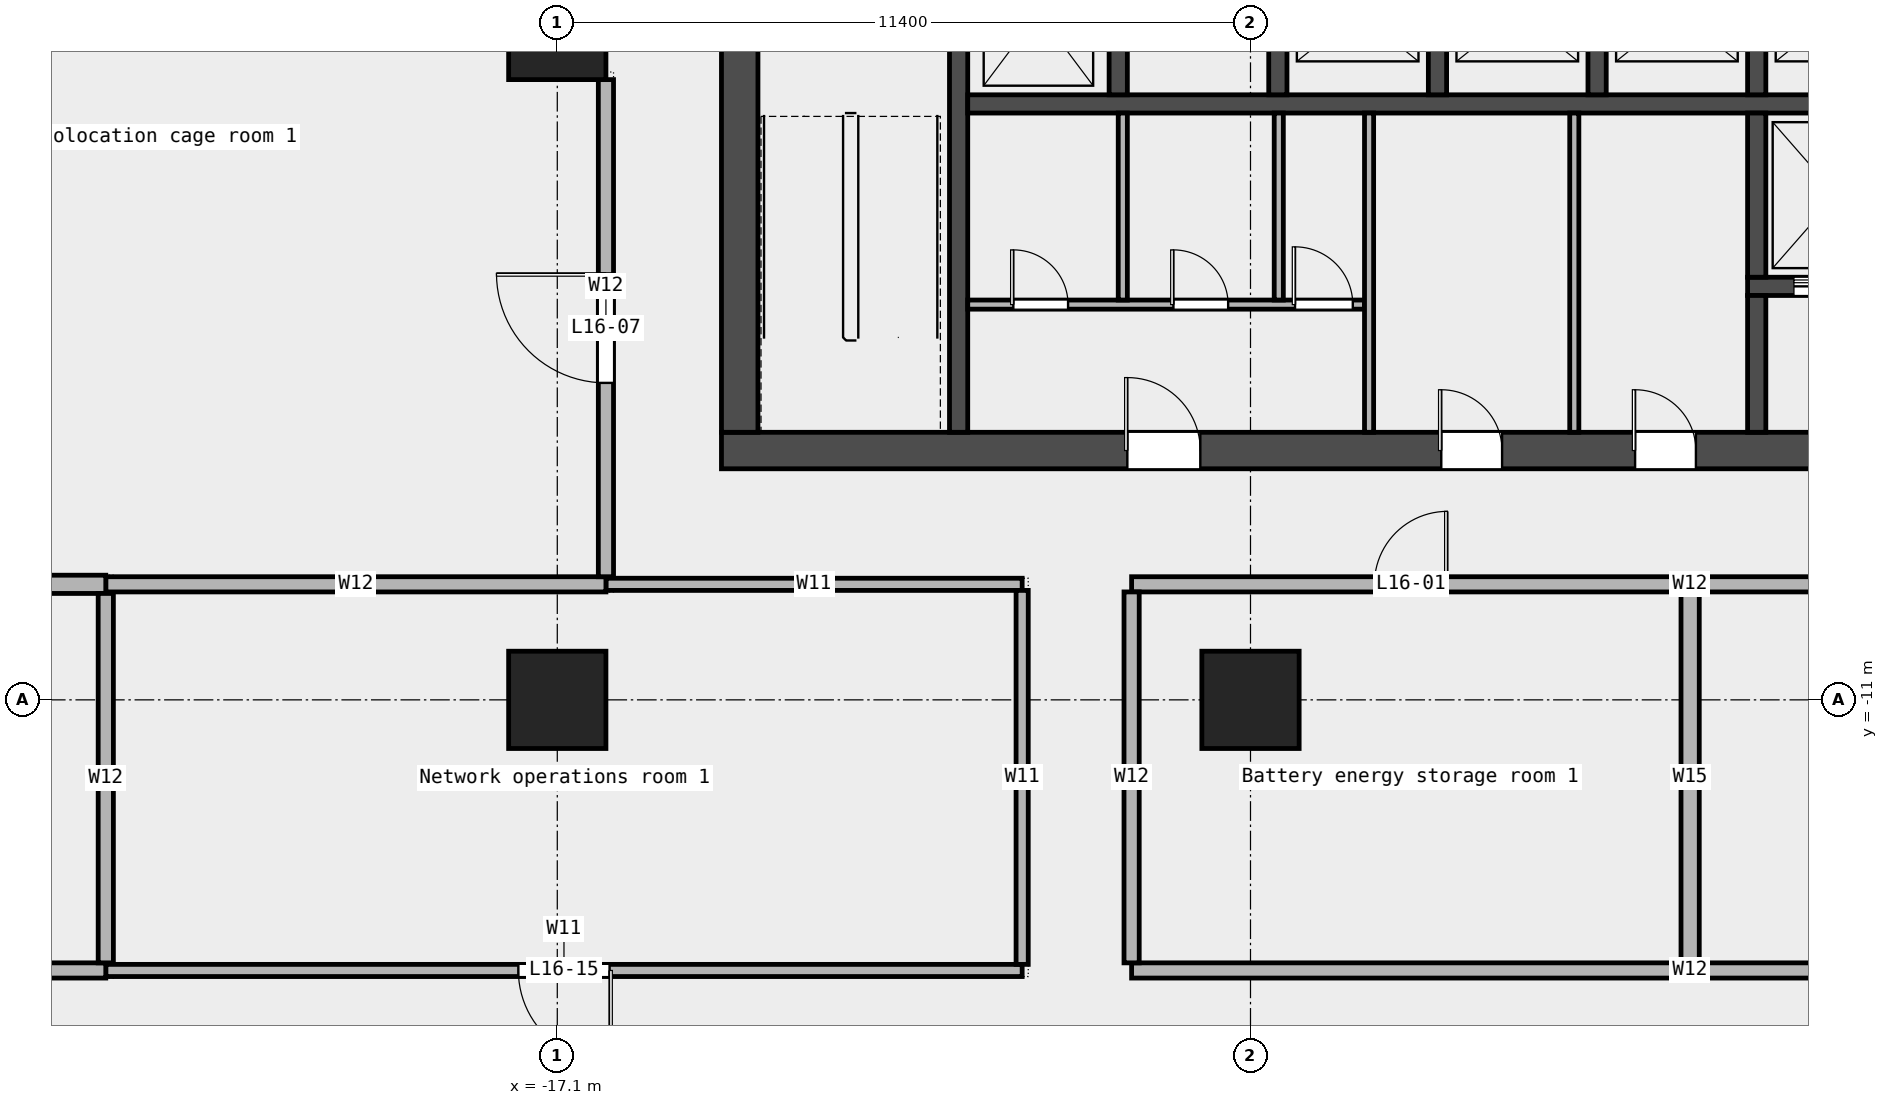
"""IFC4 building model, lengths in metres.
Left out: names, types, materials, properties, quantities, classifications, styles, units other than length and angle.
Written with IfcOpenShell. Run it as: python <this file> out.ifc"""

import sys

from ifc_helpers import new_model, si_unit, direction, frame, frame_2d, origin, origin_2d, place, context, subcontext, project, spatial, rectangle, extrude, element, fill, save


model = new_model("IFC4")
c1 = context("Model", 3, precision=1e-05, world=origin(), true_north=direction((0.0, 1.0)))
c2 = subcontext(c1, "Body", "Model", "MODEL_VIEW")
j1 = project(units=[si_unit("LENGTHUNIT", "METRE"), si_unit("PLANEANGLEUNIT", "RADIAN")], contexts=[c1])
p1 = place(None, origin())
s1 = spatial("IfcSite", under=j1, at=p1, CompositionType="ELEMENT")
p2 = place(p1, origin())
s2 = spatial("IfcBuilding", under=s1, at=p2, CompositionType="ELEMENT")
p3 = place(p2, frame((0.0, 0.0, 83.8)))
s3 = spatial("IfcBuildingStorey", under=s2, at=p3, CompositionType="ELEMENT", Elevation=83.8)
for number, where, z_axis, x_axis in (
    (1, (-17.1, -11.0, 0.0), (0.0, 0.0, 1.0), (1.0, 0.0, 0.0)),
    (2, (-17.1, 0.0, 0.0), (0.0, 0.0, 1.0), (1.0, 0.0, 0.0)),
    (3, (-5.7, -11.0, 0.0), (0.0, 0.0, 1.0), (1.0, 0.0, 0.0)),
):
    element("IfcColumn", number, at=place(p3, frame(where, z_axis=z_axis, x_axis=x_axis)), inside=s3, PredefinedType="COLUMN", context=c2, shape_type="SweptSolid", body=[
        extrude(rectangle(XDim=1.6, YDim=1.6, at=origin_2d()), origin(), (0.0, 0.0, 1.0), 4.2),
    ])
p4 = place(p3, frame((-24.525, -15.45, 0.0), z_axis=(0.0, 0.0, 1.0), x_axis=(1.0, 0.0, 0.0)))
e4 = element("IfcWall", 4, at=p4, inside=s3, PredefinedType="PARTITIONING", context=c2, shape_type="SweptSolid", body=[
    extrude(rectangle(XDim=15.07, YDim=0.2, at=frame_2d((7.535, 0.0))), origin(), (0.0, 0.0, 1.0), 4.2),
])
p5 = place(p4, frame((6.785, 0.0, 0.0)))
e5 = element("IfcOpeningElement", 5, at=p5, cuts=e4, PredefinedType="OPENING", context=c2, shape_type="SweptSolid", body=[
    extrude(rectangle(XDim=1.5, YDim=2.1, at=frame_2d((0.75, 1.05))), frame((0.0, 0.112, 0.0), z_axis=(0.0, -1.0, 0.0), x_axis=(1.0, 0.0, 0.0)), (0.0, 0.0, 1.0), 0.224),
])
p6 = place(p3, frame((-30.75, -15.45, 0.0), z_axis=(0.0, 0.0, 1.0), x_axis=(1.0, 0.0, 0.0)))
e6 = element("IfcWall", 6, at=p6, inside=s3, PredefinedType="PARTITIONING", context=c2, shape_type="SweptSolid", body=[
    extrude(rectangle(XDim=6.225, YDim=0.25, at=frame_2d((3.113, 0.0))), origin(), (0.0, 0.0, 1.0), 4.2),
])
p7 = place(p6, frame((2.762, 0.0, 0.0)))
e7 = element("IfcOpeningElement", 7, at=p7, cuts=e6, PredefinedType="OPENING", context=c2, shape_type="SweptSolid", body=[
    extrude(rectangle(XDim=0.9, YDim=2.1, at=frame_2d((0.45, 1.05))), frame((0.0, 0.137, 0.0), z_axis=(0.0, -1.0, 0.0), x_axis=(1.0, 0.0, 0.0)), (0.0, 0.0, 1.0), 0.274),
])
p8 = place(p3, frame((-7.655, -15.45, 0.0), z_axis=(0.0, 0.0, 1.0), x_axis=(1.0, 0.0, 0.0)))
e8 = element("IfcWall", 8, at=p8, inside=s3, PredefinedType="PARTITIONING", context=c2, shape_type="SweptSolid", body=[
    extrude(rectangle(XDim=18.365, YDim=0.25, at=frame_2d((9.183, 0.0))), origin(), (0.0, 0.0, 1.0), 4.2),
])
p9 = place(p3, frame((-16.3, -9.1, 0.0), z_axis=(0.0, 0.0, 1.0), x_axis=(1.0, 0.0, 0.0)))
e9 = element("IfcWall", 9, at=p9, inside=s3, PredefinedType="PARTITIONING", context=c2, shape_type="SweptSolid", body=[
    extrude(rectangle(XDim=6.845, YDim=0.2, at=frame_2d((3.422, 0.0))), origin(), (0.0, 0.0, 1.0), 4.2),
])
p10 = place(p3, frame((-24.525, -9.1, 0.0), z_axis=(0.0, 0.0, 1.0), x_axis=(1.0, 0.0, 0.0)))
e10 = element("IfcWall", 10, at=p10, inside=s3, PredefinedType="PARTITIONING", context=c2, shape_type="SweptSolid", body=[
    extrude(rectangle(XDim=8.225, YDim=0.25, at=frame_2d((4.112, 0.0))), origin(), (0.0, 0.0, 1.0), 4.2),
])
p11 = place(p3, frame((-7.655, -9.1, 0.0), z_axis=(0.0, 0.0, 1.0), x_axis=(1.0, 0.0, 0.0)))
e11 = element("IfcWall", 11, at=p11, inside=s3, PredefinedType="PARTITIONING", context=c2, shape_type="SweptSolid", body=[
    extrude(rectangle(XDim=18.365, YDim=0.25, at=frame_2d((9.183, 0.0))), origin(), (0.0, 0.0, 1.0), 4.2),
])
p12 = place(p11, frame((3.992, 0.0, 0.0)))
e12 = element("IfcOpeningElement", 12, at=p12, cuts=e11, PredefinedType="OPENING", context=c2, shape_type="SweptSolid", body=[
    extrude(rectangle(XDim=1.2, YDim=2.1, at=frame_2d((0.6, 1.05))), frame((0.0, 0.137, 0.0), z_axis=(0.0, -1.0, 0.0), x_axis=(1.0, 0.0, 0.0)), (0.0, 0.0, 1.0), 0.274),
])
p13 = place(p11, frame((14.375, 0.0, 0.0)))
e13 = element("IfcOpeningElement", 13, at=p13, cuts=e11, PredefinedType="OPENING", context=c2, shape_type="SweptSolid", body=[
    extrude(rectangle(XDim=1.2, YDim=2.1, at=frame_2d((0.6, 1.05))), frame((0.0, 0.137, 0.0), z_axis=(0.0, -1.0, 0.0), x_axis=(1.0, 0.0, 0.0)), (0.0, 0.0, 1.0), 0.274),
])
p14 = place(p3, frame((-30.75, -9.1, 0.0), z_axis=(0.0, 0.0, 1.0), x_axis=(1.0, 0.0, 0.0)))
e14 = element("IfcWall", 14, at=p14, inside=s3, PredefinedType="PARTITIONING", context=c2, shape_type="SweptSolid", body=[
    extrude(rectangle(XDim=6.225, YDim=0.3, at=frame_2d((3.113, 0.0))), origin(), (0.0, 0.0, 1.0), 4.2),
])
p15 = place(p3, frame((-24.525, -15.325, 0.0), z_axis=(0.0, 0.0, 1.0), x_axis=(0.0, 1.0, 0.0)))
e15 = element("IfcWall", 15, at=p15, inside=s3, PredefinedType="PARTITIONING", context=c2, shape_type="SweptSolid", body=[
    extrude(rectangle(XDim=6.075, YDim=0.25, at=frame_2d((3.038, 0.0))), origin(), (0.0, 0.0, 1.0), 4.2),
])
p16 = place(p3, frame((-16.3, -8.975, 0.0), z_axis=(0.0, 0.0, 1.0), x_axis=(0.0, 1.0, 0.0)))
e16 = element("IfcWall", 16, at=p16, inside=s3, PredefinedType="PARTITIONING", context=c2, shape_type="SweptSolid", body=[
    extrude(rectangle(XDim=8.175, YDim=0.25, at=frame_2d((4.087, 0.0))), origin(), (0.0, 0.0, 1.0), 4.2),
])
p17 = place(p16, frame((3.188, 0.0, 0.0)))
e17 = element("IfcOpeningElement", 17, at=p17, cuts=e16, PredefinedType="OPENING", context=c2, shape_type="SweptSolid", body=[
    extrude(rectangle(XDim=1.8, YDim=2.1, at=frame_2d((0.9, 1.05))), frame((0.0, 0.137, 0.0), z_axis=(0.0, -1.0, 0.0), x_axis=(1.0, 0.0, 0.0)), (0.0, 0.0, 1.0), 0.274),
])
p18 = place(p3, frame((-9.455, -15.35, 0.0), z_axis=(0.0, 0.0, 1.0), x_axis=(0.0, 1.0, 0.0)))
e18 = element("IfcWall", 18, at=p18, inside=s3, PredefinedType="PARTITIONING", context=c2, shape_type="SweptSolid", body=[
    extrude(rectangle(XDim=6.15, YDim=0.2, at=frame_2d((3.075, 0.0))), origin(), (0.0, 0.0, 1.0), 4.2),
])
p19 = place(p3, frame((-7.655, -15.325, 0.0), z_axis=(0.0, 0.0, 1.0), x_axis=(0.0, 1.0, 0.0)))
e19 = element("IfcWall", 19, at=p19, inside=s3, PredefinedType="PARTITIONING", context=c2, shape_type="SweptSolid", body=[
    extrude(rectangle(XDim=6.1, YDim=0.25, at=frame_2d((3.05, 0.0))), origin(), (0.0, 0.0, 1.0), 4.2),
])
p20 = place(p3, frame((1.53, -15.325, 0.0), z_axis=(0.0, 0.0, 1.0), x_axis=(0.0, 1.0, 0.0)))
e20 = element("IfcWall", 20, at=p20, inside=s3, PredefinedType="PARTITIONING", context=c2, shape_type="SweptSolid", body=[
    extrude(rectangle(XDim=6.1, YDim=0.3, at=frame_2d((3.05, 0.0))), origin(), (0.0, 0.0, 1.0), 4.2),
])
p21 = place(p3, frame((-14.4, -6.9, 0.0), z_axis=(0.0, 0.0, 1.0), x_axis=(1.0, 0.0, 0.0)))
e21 = element("IfcWall", 21, at=p21, inside=s3, PredefinedType="SHEAR", context=c2, shape_type="SweptSolid", body=[
    extrude(rectangle(XDim=28.8, YDim=0.6, at=frame_2d((14.4, 0.0))), origin(), (0.0, 0.0, 1.0), 4.5),
])
p22 = place(p21, frame((6.675, 0.0, 0.0)))
e22 = element("IfcOpeningElement", 22, at=p22, cuts=e21, PredefinedType="OPENING", context=c2, shape_type="SweptSolid", body=[
    extrude(rectangle(XDim=1.2, YDim=2.1, at=frame_2d((0.6, 1.05))), frame((0.0, 0.312, 0.0), z_axis=(0.0, -1.0, 0.0), x_axis=(1.0, 0.0, 0.0)), (0.0, 0.0, 1.0), 0.624),
])
p23 = place(p21, frame((11.837, 0.0, 0.0)))
e23 = element("IfcOpeningElement", 23, at=p23, cuts=e21, PredefinedType="OPENING", context=c2, shape_type="SweptSolid", body=[
    extrude(rectangle(XDim=1.0, YDim=2.1, at=frame_2d((0.5, 1.05))), frame((0.0, 0.312, 0.0), z_axis=(0.0, -1.0, 0.0), x_axis=(1.0, 0.0, 0.0)), (0.0, 0.0, 1.0), 0.624),
])
p24 = place(p21, frame((15.025, 0.0, 0.0)))
e24 = element("IfcOpeningElement", 24, at=p24, cuts=e21, PredefinedType="OPENING", context=c2, shape_type="SweptSolid", body=[
    extrude(rectangle(XDim=1.0, YDim=2.1, at=frame_2d((0.5, 1.05))), frame((0.0, 0.312, 0.0), z_axis=(0.0, -1.0, 0.0), x_axis=(1.0, 0.0, 0.0)), (0.0, 0.0, 1.0), 0.624),
])
p25 = place(p21, frame((18.75, 0.0, 0.0)))
e25 = element("IfcOpeningElement", 25, at=p25, cuts=e21, PredefinedType="OPENING", context=c2, shape_type="SweptSolid", body=[
    extrude(rectangle(XDim=1.8, YDim=2.1, at=frame_2d((0.9, 1.05))), frame((0.0, 0.312, 0.0), z_axis=(0.0, -1.0, 0.0), x_axis=(1.0, 0.0, 0.0)), (0.0, 0.0, 1.0), 0.624),
])
p26 = place(p21, frame((23.087, 0.0, 0.0)))
e26 = element("IfcOpeningElement", 26, at=p26, cuts=e21, PredefinedType="OPENING", context=c2, shape_type="SweptSolid", body=[
    extrude(rectangle(XDim=1.0, YDim=2.1, at=frame_2d((0.5, 1.05))), frame((0.0, 0.312, 0.0), z_axis=(0.0, -1.0, 0.0), x_axis=(1.0, 0.0, 0.0)), (0.0, 0.0, 1.0), 0.624),
])
p27 = place(p3, frame((-14.1, -6.6, 0.0), z_axis=(0.0, 0.0, 1.0), x_axis=(0.0, 1.0, 0.0)))
e27 = element("IfcWall", 27, at=p27, inside=s3, PredefinedType="SHEAR", context=c2, shape_type="SweptSolid", body=[
    extrude(rectangle(XDim=19.5, YDim=0.6, at=frame_2d((9.75, 0.0))), origin(), (0.0, 0.0, 1.0), 4.5),
])
p28 = place(p27, frame((9.3, 0.0, 0.0)))
e28 = element("IfcOpeningElement", 28, at=p28, cuts=e27, PredefinedType="OPENING", context=c2, shape_type="SweptSolid", body=[
    extrude(rectangle(XDim=1.8, YDim=2.1, at=frame_2d((0.9, 1.05))), frame((0.0, 0.312, 0.0), z_axis=(0.0, -1.0, 0.0), x_axis=(1.0, 0.0, 0.0)), (0.0, 0.0, 1.0), 0.624),
])
p29 = place(p3, frame((-10.5, -6.6, 0.0), z_axis=(0.0, 0.0, 1.0), x_axis=(0.0, 1.0, 0.0)))
e29 = element("IfcWall", 29, at=p29, inside=s3, PredefinedType="SHEAR", context=c2, shape_type="SweptSolid", body=[
    extrude(rectangle(XDim=8.55, YDim=0.3, at=frame_2d((4.275, 0.0))), origin(), (0.0, 0.0, 1.0), 4.5),
])
p30 = place(p3, frame((-10.35, -1.2, 0.0), z_axis=(0.0, 0.0, 1.0), x_axis=(1.0, 0.0, 0.0)))
e30 = element("IfcWall", 30, at=p30, inside=s3, PredefinedType="SOLIDWALL", context=c2, shape_type="SweptSolid", body=[
    extrude(rectangle(XDim=20.7, YDim=0.3, at=frame_2d((10.35, 0.0))), origin(), (0.0, 0.0, 1.0), 4.5),
])
for number, where, z_axis, x_axis in (
    (31, (-7.875, -1.05, 0.0), (0.0, 0.0, 1.0), (0.0, 1.0, 0.0)),
    (32, (-5.25, -1.05, 0.0), (0.0, 0.0, 1.0), (0.0, 1.0, 0.0)),
    (33, (-2.625, -1.05, 0.0), (0.0, 0.0, 1.0), (0.0, 1.0, 0.0)),
    (34, (0.0, -1.05, 0.0), (0.0, 0.0, 1.0), (0.0, 1.0, 0.0)),
    (35, (2.625, -1.05, 0.0), (0.0, 0.0, 1.0), (0.0, 1.0, 0.0)),
):
    element("IfcWall", number, at=place(p3, frame(where, z_axis=z_axis, x_axis=x_axis)), inside=s3, PredefinedType="SOLIDWALL", context=c2, shape_type="SweptSolid", body=[
        extrude(rectangle(XDim=2.7, YDim=0.3, at=frame_2d((1.35, 0.0))), origin(), (0.0, 0.0, 1.0), 4.5),
    ])
p31 = place(p3, frame((2.475, -4.2, 0.0), z_axis=(0.0, 0.0, 1.0), x_axis=(1.0, 0.0, 0.0)))
e36 = element("IfcWall", 36, at=p31, inside=s3, PredefinedType="SOLIDWALL", context=c2, shape_type="SweptSolid", body=[
    extrude(rectangle(XDim=5.55, YDim=0.3, at=frame_2d((2.775, 0.0))), origin(), (0.0, 0.0, 1.0), 4.5),
])
p32 = place(p31, frame((0.762, 0.0, 0.0)))
e37 = element("IfcOpeningElement", 37, at=p32, cuts=e36, PredefinedType="OPENING", context=c2, shape_type="SweptSolid", body=[
    extrude(rectangle(XDim=1.4, YDim=2.1, at=frame_2d((0.7, 1.05))), frame((0.0, 0.162, 0.0), z_axis=(0.0, -1.0, 0.0), x_axis=(1.0, 0.0, 0.0)), (0.0, 0.0, 1.0), 0.324),
])
p33 = place(p31, frame((3.387, 0.0, 0.0)))
e38 = element("IfcOpeningElement", 38, at=p33, cuts=e36, PredefinedType="OPENING", context=c2, shape_type="SweptSolid", body=[
    extrude(rectangle(XDim=1.4, YDim=2.1, at=frame_2d((0.7, 1.05))), frame((0.0, 0.162, 0.0), z_axis=(0.0, -1.0, 0.0), x_axis=(1.0, 0.0, 0.0)), (0.0, 0.0, 1.0), 0.324),
])
p34 = place(p3, frame((2.625, -4.05, 0.0), z_axis=(0.0, 0.0, 1.0), x_axis=(0.0, 1.0, 0.0)))
e39 = element("IfcWall", 39, at=p34, inside=s3, PredefinedType="SOLIDWALL", context=c2, shape_type="SweptSolid", body=[
    extrude(rectangle(XDim=2.7, YDim=0.3, at=frame_2d((1.35, 0.0))), origin(), (0.0, 0.0, 1.0), 4.5),
])
p35 = place(p3, frame((2.625, -6.6, 0.0), z_axis=(0.0, 0.0, 1.0), x_axis=(0.0, 1.0, 0.0)))
e40 = element("IfcWall", 40, at=p35, inside=s3, PredefinedType="SOLIDWALL", context=c2, shape_type="SweptSolid", body=[
    extrude(rectangle(XDim=2.25, YDim=0.3, at=frame_2d((1.125, 0.0))), origin(), (0.0, 0.0, 1.0), 4.5),
])
p36 = place(p3, frame((-10.35, -4.5, 0.0), z_axis=(0.0, 0.0, 1.0), x_axis=(1.0, 0.0, 0.0)))
e41 = element("IfcWall", 41, at=p36, inside=s3, PredefinedType="PARTITIONING", context=c2, shape_type="SweptSolid", body=[
    extrude(rectangle(XDim=6.525, YDim=0.15, at=frame_2d((3.263, 0.0))), origin(), (0.0, 0.0, 1.0), 4.5),
])
p37 = place(p36, frame((0.75, 0.0, 0.0)))
e42 = element("IfcOpeningElement", 42, at=p37, cuts=e41, PredefinedType="OPENING", context=c2, shape_type="SweptSolid", body=[
    extrude(rectangle(XDim=0.9, YDim=2.1, at=frame_2d((0.45, 1.05))), frame((0.0, 0.087, 0.0), z_axis=(0.0, -1.0, 0.0), x_axis=(1.0, 0.0, 0.0)), (0.0, 0.0, 1.0), 0.174),
])
p38 = place(p36, frame((3.383, 0.0, 0.0)))
e43 = element("IfcOpeningElement", 43, at=p38, cuts=e41, PredefinedType="OPENING", context=c2, shape_type="SweptSolid", body=[
    extrude(rectangle(XDim=0.9, YDim=2.1, at=frame_2d((0.45, 1.05))), frame((0.0, 0.087, 0.0), z_axis=(0.0, -1.0, 0.0), x_axis=(1.0, 0.0, 0.0)), (0.0, 0.0, 1.0), 0.174),
])
p39 = place(p36, frame((5.383, 0.0, 0.0)))
e44 = element("IfcOpeningElement", 44, at=p39, cuts=e41, PredefinedType="OPENING", context=c2, shape_type="SweptSolid", body=[
    extrude(rectangle(XDim=0.95, YDim=2.1, at=frame_2d((0.475, 1.05))), frame((0.0, 0.087, 0.0), z_axis=(0.0, -1.0, 0.0), x_axis=(1.0, 0.0, 0.0)), (0.0, 0.0, 1.0), 0.174),
])
for number, where, z_axis, x_axis in (
    (45, (-7.8, -4.425, 0.0), (0.0, 0.0, 1.0), (0.0, 1.0, 0.0)),
    (46, (-5.235, -4.425, 0.0), (0.0, 0.0, 1.0), (0.0, 1.0, 0.0)),
):
    element("IfcWall", number, at=place(p3, frame(where, z_axis=z_axis, x_axis=x_axis)), inside=s3, PredefinedType="PARTITIONING", context=c2, shape_type="SweptSolid", body=[
        extrude(rectangle(XDim=3.075, YDim=0.15, at=frame_2d((1.538, 0.0))), origin(), (0.0, 0.0, 1.0), 4.5),
    ])
for number, where, z_axis, x_axis in (
    (47, (-3.75, -6.6, 0.0), (0.0, 0.0, 1.0), (0.0, 1.0, 0.0)),
    (48, (-0.375, -6.6, 0.0), (0.0, 0.0, 1.0), (0.0, 1.0, 0.0)),
):
    element("IfcWall", number, at=place(p3, frame(where, z_axis=z_axis, x_axis=x_axis)), inside=s3, PredefinedType="PARTITIONING", context=c2, shape_type="SweptSolid", body=[
        extrude(rectangle(XDim=5.25, YDim=0.15, at=frame_2d((2.625, 0.0))), origin(), (0.0, 0.0, 1.0), 4.5),
    ])
p40 = place(p12, origin())
e49 = element("IfcDoor", 49, at=p40, inside=s3, OperationType="SINGLE_SWING_RIGHT", PredefinedType="DOOR", context=c2, shape_type="SweptSolid", body=[
    extrude(rectangle(XDim=1.2, YDim=2.1, at=frame_2d((0.6, 1.05))), frame((0.0, 0.025, 0.0), z_axis=(0.0, -1.0, 0.0), x_axis=(1.0, 0.0, 0.0)), (0.0, 0.0, 1.0), 0.05),
])
fill(e12, e49)
p41 = place(p17, origin())
e50 = element("IfcDoor", 50, at=p41, inside=s3, OperationType="DOUBLE_DOOR_SINGLE_SWING", PredefinedType="DOOR", context=c2, shape_type="SweptSolid", body=[
    extrude(rectangle(XDim=1.8, YDim=2.1, at=frame_2d((0.9, 1.05))), frame((0.0, 0.025, 0.0), z_axis=(0.0, -1.0, 0.0), x_axis=(1.0, 0.0, 0.0)), (0.0, 0.0, 1.0), 0.05),
])
fill(e17, e50)
p42 = place(p5, origin())
e51 = element("IfcDoor", 51, at=p42, inside=s3, OperationType="DOUBLE_DOOR_SINGLE_SWING", PredefinedType="DOOR", context=c2, shape_type="SweptSolid", body=[
    extrude(rectangle(XDim=1.5, YDim=2.1, at=frame_2d((0.75, 1.05))), frame((0.0, 0.025, 0.0), z_axis=(0.0, -1.0, 0.0), x_axis=(1.0, 0.0, 0.0)), (0.0, 0.0, 1.0), 0.05),
])
fill(e5, e51)
p43 = place(p32, origin())
e52 = element("IfcDoor", 52, at=p43, inside=s3, OperationType="DOUBLE_DOOR_SLIDING", PredefinedType="DOOR", context=c2, shape_type="SweptSolid", body=[
    extrude(rectangle(XDim=1.4, YDim=2.1, at=frame_2d((0.7, 1.05))), frame((0.0, 0.025, 0.0), z_axis=(0.0, -1.0, 0.0), x_axis=(1.0, 0.0, 0.0)), (0.0, 0.0, 1.0), 0.05),
])
fill(e37, e52)
p44 = place(p22, origin())
e53 = element("IfcDoor", 53, at=p44, inside=s3, OperationType="SINGLE_SWING_LEFT", PredefinedType="DOOR", context=c2, shape_type="SweptSolid", body=[
    extrude(rectangle(XDim=1.2, YDim=2.1, at=frame_2d((0.6, 1.05))), frame((0.0, 0.025, 0.0), z_axis=(0.0, -1.0, 0.0), x_axis=(1.0, 0.0, 0.0)), (0.0, 0.0, 1.0), 0.05),
])
fill(e22, e53)
p45 = place(p37, origin())
e54 = element("IfcDoor", 54, at=p45, inside=s3, OperationType="SINGLE_SWING_LEFT", PredefinedType="DOOR", context=c2, shape_type="SweptSolid", body=[
    extrude(rectangle(XDim=0.9, YDim=2.1, at=frame_2d((0.45, 1.05))), frame((0.0, 0.025, 0.0), z_axis=(0.0, -1.0, 0.0), x_axis=(1.0, 0.0, 0.0)), (0.0, 0.0, 1.0), 0.05),
])
fill(e42, e54)
p46 = place(p38, origin())
e55 = element("IfcDoor", 55, at=p46, inside=s3, OperationType="SINGLE_SWING_LEFT", PredefinedType="DOOR", context=c2, shape_type="SweptSolid", body=[
    extrude(rectangle(XDim=0.9, YDim=2.1, at=frame_2d((0.45, 1.05))), frame((0.0, 0.025, 0.0), z_axis=(0.0, -1.0, 0.0), x_axis=(1.0, 0.0, 0.0)), (0.0, 0.0, 1.0), 0.05),
])
fill(e43, e55)
p47 = place(p39, origin())
e56 = element("IfcDoor", 56, at=p47, inside=s3, OperationType="SINGLE_SWING_LEFT", PredefinedType="DOOR", context=c2, shape_type="SweptSolid", body=[
    extrude(rectangle(XDim=0.95, YDim=2.1, at=frame_2d((0.475, 1.05))), frame((0.0, 0.025, 0.0), z_axis=(0.0, -1.0, 0.0), x_axis=(1.0, 0.0, 0.0)), (0.0, 0.0, 1.0), 0.05),
])
fill(e44, e56)
p48 = place(p23, origin())
e57 = element("IfcDoor", 57, at=p48, inside=s3, OperationType="SINGLE_SWING_LEFT", PredefinedType="DOOR", context=c2, shape_type="SweptSolid", body=[
    extrude(rectangle(XDim=1.0, YDim=2.1, at=frame_2d((0.5, 1.05))), frame((0.0, 0.025, 0.0), z_axis=(0.0, -1.0, 0.0), x_axis=(1.0, 0.0, 0.0)), (0.0, 0.0, 1.0), 0.05),
])
fill(e23, e57)
p49 = place(p24, origin())
e58 = element("IfcDoor", 58, at=p49, inside=s3, OperationType="SINGLE_SWING_LEFT", PredefinedType="DOOR", context=c2, shape_type="SweptSolid", body=[
    extrude(rectangle(XDim=1.0, YDim=2.1, at=frame_2d((0.5, 1.05))), frame((0.0, 0.025, 0.0), z_axis=(0.0, -1.0, 0.0), x_axis=(1.0, 0.0, 0.0)), (0.0, 0.0, 1.0), 0.05),
])
fill(e24, e58)
save(model, sys.argv[1])
